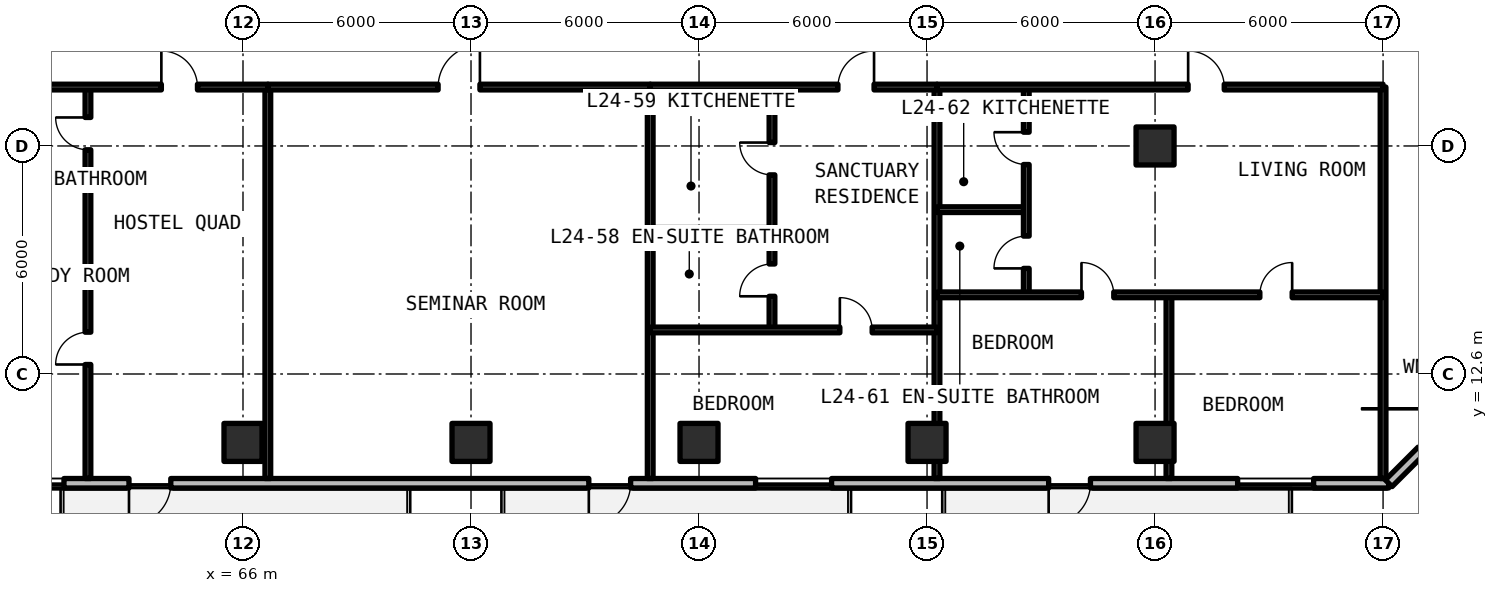
"""IFC4 building model, lengths in metres.
Left out: names, types, materials, properties, quantities, classifications, styles, units other than length and angle.
Written with IfcOpenShell. Run it as: python <this file> out.ifc"""

import sys

from ifc_helpers import new_model, si_unit, direction, frame, frame_2d, origin, origin_2d, place, context, subcontext, project, spatial, rectangle, extrude, element, fill, save


model = new_model("IFC4")
c1 = context("Model", 3, precision=1e-05, world=origin(), true_north=direction((0.0, 1.0)))
c2 = subcontext(c1, "Body", "Model", "MODEL_VIEW")
j1 = project(units=[si_unit("LENGTHUNIT", "METRE"), si_unit("PLANEANGLEUNIT", "RADIAN")], contexts=[c1])
p1 = place(None, origin())
s1 = spatial("IfcSite", under=j1, at=p1, CompositionType="ELEMENT")
p2 = place(p1, origin())
s2 = spatial("IfcBuilding", under=s1, at=p2, CompositionType="ELEMENT")
p3 = place(p2, frame((0.0, 0.0, 88.77)))
s3 = spatial("IfcBuildingStorey", under=s2, at=p3, CompositionType="ELEMENT", Elevation=88.77)
for number, where, z_axis, x_axis in (
    (1, (90.0, 18.6, 0.0), (0.0, 0.0, 1.0), (1.0, 0.0, 0.0)),
    (2, (66.0, 10.8, 0.0), (0.0, 0.0, 1.0), (1.0, 0.0, 0.0)),
    (3, (72.0, 10.8, 0.0), (0.0, 0.0, 1.0), (1.0, 0.0, 0.0)),
    (4, (78.0, 10.8, 0.0), (0.0, 0.0, 1.0), (1.0, 0.0, 0.0)),
    (5, (84.0, 10.8, 0.0), (0.0, 0.0, 1.0), (1.0, 0.0, 0.0)),
    (6, (90.0, 10.8, 0.0), (0.0, 0.0, 1.0), (1.0, 0.0, 0.0)),
):
    element("IfcColumn", number, at=place(p3, frame(where, z_axis=z_axis, x_axis=x_axis)), inside=s3, PredefinedType="COLUMN", context=c2, shape_type="SweptSolid", body=[
        extrude(rectangle(XDim=1.0, YDim=1.0, at=origin_2d()), origin(), (0.0, 0.0, 1.0), 3.3),
    ])
p4 = place(p3, frame((52.125, 9.725, 0.0), z_axis=(0.0, 0.0, 1.0), x_axis=(1.0, 0.0, 0.0)))
e7 = element("IfcWall", 7, at=p4, inside=s3, PredefinedType="SOLIDWALL", context=c2, shape_type="SweptSolid", body=[
    extrude(rectangle(XDim=44.023, YDim=0.25, at=frame_2d((22.012, 0.0))), origin(), (0.0, 0.0, 1.0), 3.08),
])
p5 = place(p4, frame((10.875, 0.0, 0.0)))
e8 = element("IfcOpeningElement", 8, at=p5, cuts=e7, PredefinedType="OPENING", context=c2, shape_type="SweptSolid", body=[
    extrude(rectangle(XDim=1.1, YDim=2.15, at=frame_2d((0.55, 1.075))), frame((0.0, 0.135, 0.0), z_axis=(0.0, -1.0, 0.0), x_axis=(1.0, 0.0, 0.0)), (0.0, 0.0, 1.0), 0.27),
])
p6 = place(p4, frame((22.975, 0.0, 0.0)))
e9 = element("IfcOpeningElement", 9, at=p6, cuts=e7, PredefinedType="OPENING", context=c2, shape_type="SweptSolid", body=[
    extrude(rectangle(XDim=1.1, YDim=2.15, at=frame_2d((0.55, 1.075))), frame((0.0, 0.135, 0.0), z_axis=(0.0, -1.0, 0.0), x_axis=(1.0, 0.0, 0.0)), (0.0, 0.0, 1.0), 0.27),
])
p7 = place(p4, frame((35.075, 0.0, 0.0)))
e10 = element("IfcOpeningElement", 10, at=p7, cuts=e7, PredefinedType="OPENING", context=c2, shape_type="SweptSolid", body=[
    extrude(rectangle(XDim=1.1, YDim=2.15, at=frame_2d((0.55, 1.075))), frame((0.0, 0.135, 0.0), z_axis=(0.0, -1.0, 0.0), x_axis=(1.0, 0.0, 0.0)), (0.0, 0.0, 1.0), 0.27),
])
p8 = place(p4, frame((2.669, 0.0, 0.78)))
e11 = element("IfcOpeningElement", 11, at=p8, cuts=e7, PredefinedType="OPENING", context=c2, shape_type="SweptSolid", body=[
    extrude(rectangle(XDim=2.0, YDim=1.66, at=frame_2d((1.0, 0.83))), frame((0.0, 0.135, 0.0), z_axis=(0.0, -1.0, 0.0), x_axis=(1.0, 0.0, 0.0)), (0.0, 0.0, 1.0), 0.27),
])
p9 = place(p4, frame((8.314, 0.0, 0.78)))
e12 = element("IfcOpeningElement", 12, at=p9, cuts=e7, PredefinedType="OPENING", context=c2, shape_type="SweptSolid", body=[
    extrude(rectangle(XDim=0.85, YDim=1.65, at=frame_2d((0.425, 0.825))), frame((0.0, 0.135, 0.0), z_axis=(0.0, -1.0, 0.0), x_axis=(1.0, 0.0, 0.0)), (0.0, 0.0, 1.0), 0.27),
])
p10 = place(p4, frame((27.363, 0.0, 0.78)))
e13 = element("IfcOpeningElement", 13, at=p10, cuts=e7, PredefinedType="OPENING", context=c2, shape_type="SweptSolid", body=[
    extrude(rectangle(XDim=2.0, YDim=1.66, at=frame_2d((1.0, 0.83))), frame((0.0, 0.135, 0.0), z_axis=(0.0, -1.0, 0.0), x_axis=(1.0, 0.0, 0.0)), (0.0, 0.0, 1.0), 0.27),
])
p11 = place(p4, frame((40.048, 0.0, 0.78)))
e14 = element("IfcOpeningElement", 14, at=p11, cuts=e7, PredefinedType="OPENING", context=c2, shape_type="SweptSolid", body=[
    extrude(rectangle(XDim=2.0, YDim=1.66, at=frame_2d((1.0, 0.83))), frame((0.0, 0.135, 0.0), z_axis=(0.0, -1.0, 0.0), x_axis=(1.0, 0.0, 0.0)), (0.0, 0.0, 1.0), 0.27),
])
p12 = place(p3, frame((96.148, 9.725, 0.0), z_axis=(0.0, 0.0, 1.0), x_axis=(0.707106781187, 0.707106781187, 0.0)))
e15 = element("IfcWall", 15, at=p12, inside=s3, PredefinedType="SOLIDWALL", context=c2, shape_type="SweptSolid", body=[
    extrude(rectangle(XDim=5.836, YDim=0.25, at=frame_2d((2.918, 0.0))), origin(), (0.0, 0.0, 1.0), 3.08),
])
p13 = place(p12, frame((1.218, 0.0, 0.78)))
e16 = element("IfcOpeningElement", 16, at=p13, cuts=e15, PredefinedType="OPENING", context=c2, shape_type="SweptSolid", body=[
    extrude(rectangle(XDim=3.4, YDim=1.66, at=frame_2d((1.7, 0.83))), frame((0.0, 0.135, 0.0), z_axis=(0.0, -1.0, 0.0), x_axis=(1.0, 0.0, 0.0)), (0.0, 0.0, 1.0), 0.27),
])
for number, where, z_axis, x_axis in (
    (17, (96.0, 9.85, 0.0), (0.0, 0.0, 1.0), (0.0, 1.0, 0.0)),
    (18, (66.654, 9.85, 0.0), (0.0, 0.0, 1.0), (0.0, 1.0, 0.0)),
):
    element("IfcWall", number, at=place(p3, frame(where, z_axis=z_axis, x_axis=x_axis)), inside=s3, PredefinedType="SOLIDWALL", context=c2, shape_type="SweptSolid", body=[
        extrude(rectangle(XDim=10.3, YDim=0.15, at=frame_2d((5.15, 0.0))), origin(), (0.0, 0.0, 1.0), 2.35),
    ])
p14 = place(p3, frame((58.828, 17.7, 0.0), z_axis=(0.0, 0.0, 1.0), x_axis=(1.0, 0.0, 0.0)))
e19 = element("IfcWall", 19, at=p14, inside=s3, PredefinedType="PARTITIONING", context=c2, shape_type="SweptSolid", body=[
    extrude(rectangle(XDim=3.092, YDim=0.15, at=frame_2d((1.546, 0.0))), origin(), (0.0, 0.0, 1.0), 2.35),
])
p15 = place(p3, frame((61.92, 9.85, 0.0), z_axis=(0.0, 0.0, 1.0), x_axis=(0.0, 1.0, 0.0)))
e20 = element("IfcWall", 20, at=p15, inside=s3, PredefinedType="PARTITIONING", context=c2, shape_type="SweptSolid", body=[
    extrude(rectangle(XDim=10.3, YDim=0.15, at=frame_2d((5.15, 0.0))), origin(), (0.0, 0.0, 1.0), 2.35),
])
p16 = place(p15, frame((3.0, 0.0, 0.0)))
e21 = element("IfcOpeningElement", 21, at=p16, cuts=e20, PredefinedType="OPENING", context=c2, shape_type="SweptSolid", body=[
    extrude(rectangle(XDim=0.85, YDim=2.1, at=frame_2d((0.425, 1.05))), frame((0.0, 0.085, 0.0), z_axis=(0.0, -1.0, 0.0), x_axis=(1.0, 0.0, 0.0)), (0.0, 0.0, 1.0), 0.17),
])
p17 = place(p15, frame((8.65, 0.0, 0.0)))
e22 = element("IfcOpeningElement", 22, at=p17, cuts=e20, PredefinedType="OPENING", context=c2, shape_type="SweptSolid", body=[
    extrude(rectangle(XDim=0.85, YDim=2.1, at=frame_2d((0.425, 1.05))), frame((0.0, 0.085, 0.0), z_axis=(0.0, -1.0, 0.0), x_axis=(1.0, 0.0, 0.0)), (0.0, 0.0, 1.0), 0.17),
])
p18 = place(p3, frame((58.828, 20.15, 0.0), z_axis=(0.0, 0.0, 1.0), x_axis=(1.0, 0.0, 0.0)))
e23 = element("IfcWall", 23, at=p18, inside=s3, PredefinedType="SOLIDWALL", context=c2, shape_type="SweptSolid", body=[
    extrude(rectangle(XDim=7.826, YDim=0.15, at=frame_2d((3.913, 0.0))), origin(), (0.0, 0.0, 1.0), 2.35),
])
p19 = place(p18, frame((5.024, 0.0, 0.0)))
e24 = element("IfcOpeningElement", 24, at=p19, cuts=e23, PredefinedType="OPENING", context=c2, shape_type="SweptSolid", body=[
    extrude(rectangle(XDim=0.95, YDim=2.15, at=frame_2d((0.475, 1.075))), frame((0.0, 0.085, 0.0), z_axis=(0.0, -1.0, 0.0), x_axis=(1.0, 0.0, 0.0)), (0.0, 0.0, 1.0), 0.17),
])
p20 = place(p3, frame((76.715, 9.85, 0.0), z_axis=(0.0, 0.0, 1.0), x_axis=(0.0, 1.0, 0.0)))
e25 = element("IfcWall", 25, at=p20, inside=s3, PredefinedType="SOLIDWALL", context=c2, shape_type="SweptSolid", body=[
    extrude(rectangle(XDim=10.3, YDim=0.15, at=frame_2d((5.15, 0.0))), origin(), (0.0, 0.0, 1.0), 2.35),
])
p21 = place(p3, frame((66.654, 20.15, 0.0), z_axis=(0.0, 0.0, 1.0), x_axis=(1.0, 0.0, 0.0)))
e26 = element("IfcWall", 26, at=p21, inside=s3, PredefinedType="SOLIDWALL", context=c2, shape_type="SweptSolid", body=[
    extrude(rectangle(XDim=10.062, YDim=0.15, at=frame_2d((5.031, 0.0))), origin(), (0.0, 0.0, 1.0), 2.35),
])
p22 = place(p21, frame((4.481, 0.0, 0.0)))
e27 = element("IfcOpeningElement", 27, at=p22, cuts=e26, PredefinedType="OPENING", context=c2, shape_type="SweptSolid", body=[
    extrude(rectangle(XDim=1.1, YDim=2.15, at=frame_2d((0.55, 1.075))), frame((0.0, 0.085, 0.0), z_axis=(0.0, -1.0, 0.0), x_axis=(1.0, 0.0, 0.0)), (0.0, 0.0, 1.0), 0.17),
])
p23 = place(p3, frame((84.261, 9.85, 0.0), z_axis=(0.0, 0.0, 1.0), x_axis=(0.0, 1.0, 0.0)))
e28 = element("IfcWall", 28, at=p23, inside=s3, PredefinedType="SOLIDWALL", context=c2, shape_type="SweptSolid", body=[
    extrude(rectangle(XDim=10.3, YDim=0.15, at=frame_2d((5.15, 0.0))), origin(), (0.0, 0.0, 1.0), 2.35),
])
p24 = place(p3, frame((76.715, 16.379, 0.0), z_axis=(0.0, 0.0, 1.0), x_axis=(1.0, 0.0, 0.0)))
e29 = element("IfcWall", 29, at=p24, inside=s3, PredefinedType="PARTITIONING", context=c2, shape_type="SweptSolid", body=[
    extrude(rectangle(XDim=3.205, YDim=0.15, at=frame_2d((1.603, 0.0))), origin(), (0.0, 0.0, 1.0), 2.35),
])
p25 = place(p3, frame((79.92, 13.759, 0.0), z_axis=(0.0, 0.0, 1.0), x_axis=(0.0, 1.0, 0.0)))
e30 = element("IfcWall", 30, at=p25, inside=s3, PredefinedType="PARTITIONING", context=c2, shape_type="SweptSolid", body=[
    extrude(rectangle(XDim=6.391, YDim=0.15, at=frame_2d((3.195, 0.0))), origin(), (0.0, 0.0, 1.0), 2.35),
])
p26 = place(p25, frame((0.885, 0.0, 0.0)))
e31 = element("IfcOpeningElement", 31, at=p26, cuts=e30, PredefinedType="OPENING", context=c2, shape_type="SweptSolid", body=[
    extrude(rectangle(XDim=0.85, YDim=2.1, at=frame_2d((0.425, 1.05))), frame((0.0, 0.085, 0.0), z_axis=(0.0, -1.0, 0.0), x_axis=(1.0, 0.0, 0.0)), (0.0, 0.0, 1.0), 0.17),
])
p27 = place(p25, frame((4.08, 0.0, 0.0)))
e32 = element("IfcOpeningElement", 32, at=p27, cuts=e30, PredefinedType="OPENING", context=c2, shape_type="SweptSolid", body=[
    extrude(rectangle(XDim=0.85, YDim=2.1, at=frame_2d((0.425, 1.05))), frame((0.0, 0.085, 0.0), z_axis=(0.0, -1.0, 0.0), x_axis=(1.0, 0.0, 0.0)), (0.0, 0.0, 1.0), 0.17),
])
p28 = place(p3, frame((76.715, 13.759, 0.0), z_axis=(0.0, 0.0, 1.0), x_axis=(1.0, 0.0, 0.0)))
e33 = element("IfcWall", 33, at=p28, inside=s3, PredefinedType="PARTITIONING", context=c2, shape_type="SweptSolid", body=[
    extrude(rectangle(XDim=7.546, YDim=0.15, at=frame_2d((3.773, 0.0))), origin(), (0.0, 0.0, 1.0), 2.35),
])
p29 = place(p28, frame((4.99, 0.0, 0.0)))
e34 = element("IfcOpeningElement", 34, at=p29, cuts=e33, PredefinedType="OPENING", context=c2, shape_type="SweptSolid", body=[
    extrude(rectangle(XDim=0.85, YDim=2.1, at=frame_2d((0.425, 1.05))), frame((0.0, 0.085, 0.0), z_axis=(0.0, -1.0, 0.0), x_axis=(1.0, 0.0, 0.0)), (0.0, 0.0, 1.0), 0.17),
])
p30 = place(p3, frame((76.715, 20.15, 0.0), z_axis=(0.0, 0.0, 1.0), x_axis=(1.0, 0.0, 0.0)))
e35 = element("IfcWall", 35, at=p30, inside=s3, PredefinedType="SOLIDWALL", context=c2, shape_type="SweptSolid", body=[
    extrude(rectangle(XDim=7.546, YDim=0.15, at=frame_2d((3.773, 0.0))), origin(), (0.0, 0.0, 1.0), 2.35),
])
p31 = place(p30, frame((4.94, 0.0, 0.0)))
e36 = element("IfcOpeningElement", 36, at=p31, cuts=e35, PredefinedType="OPENING", context=c2, shape_type="SweptSolid", body=[
    extrude(rectangle(XDim=0.95, YDim=2.15, at=frame_2d((0.475, 1.075))), frame((0.0, 0.085, 0.0), z_axis=(0.0, -1.0, 0.0), x_axis=(1.0, 0.0, 0.0)), (0.0, 0.0, 1.0), 0.17),
])
p32 = place(p3, frame((84.261, 16.924, 0.0), z_axis=(0.0, 0.0, 1.0), x_axis=(1.0, 0.0, 0.0)))
e37 = element("IfcWall", 37, at=p32, inside=s3, PredefinedType="PARTITIONING", context=c2, shape_type="SweptSolid", body=[
    extrude(rectangle(XDim=2.35, YDim=0.15, at=frame_2d((1.175, 0.0))), origin(), (0.0, 0.0, 1.0), 2.35),
])
p33 = place(p3, frame((86.611, 14.683, 0.0), z_axis=(0.0, 0.0, 1.0), x_axis=(0.0, 1.0, 0.0)))
e38 = element("IfcWall", 38, at=p33, inside=s3, PredefinedType="PARTITIONING", context=c2, shape_type="SweptSolid", body=[
    extrude(rectangle(XDim=5.467, YDim=0.15, at=frame_2d((2.733, 0.0))), origin(), (0.0, 0.0, 1.0), 2.35),
])
p34 = place(p33, frame((0.696, 0.0, 0.0)))
e39 = element("IfcOpeningElement", 39, at=p34, cuts=e38, PredefinedType="OPENING", context=c2, shape_type="SweptSolid", body=[
    extrude(rectangle(XDim=0.85, YDim=2.1, at=frame_2d((0.425, 1.05))), frame((0.0, 0.085, 0.0), z_axis=(0.0, -1.0, 0.0), x_axis=(1.0, 0.0, 0.0)), (0.0, 0.0, 1.0), 0.17),
])
p35 = place(p33, frame((3.429, 0.0, 0.0)))
e40 = element("IfcOpeningElement", 40, at=p35, cuts=e38, PredefinedType="OPENING", context=c2, shape_type="SweptSolid", body=[
    extrude(rectangle(XDim=0.85, YDim=2.1, at=frame_2d((0.425, 1.05))), frame((0.0, 0.085, 0.0), z_axis=(0.0, -1.0, 0.0), x_axis=(1.0, 0.0, 0.0)), (0.0, 0.0, 1.0), 0.17),
])
p36 = place(p3, frame((90.365, 9.85, 0.0), z_axis=(0.0, 0.0, 1.0), x_axis=(0.0, 1.0, 0.0)))
e41 = element("IfcWall", 41, at=p36, inside=s3, PredefinedType="PARTITIONING", context=c2, shape_type="SweptSolid", body=[
    extrude(rectangle(XDim=4.833, YDim=0.15, at=frame_2d((2.417, 0.0))), origin(), (0.0, 0.0, 1.0), 2.35),
])
p37 = place(p3, frame((84.261, 14.683, 0.0), z_axis=(0.0, 0.0, 1.0), x_axis=(1.0, 0.0, 0.0)))
e42 = element("IfcWall", 42, at=p37, inside=s3, PredefinedType="PARTITIONING", context=c2, shape_type="SweptSolid", body=[
    extrude(rectangle(XDim=11.739, YDim=0.15, at=frame_2d((5.869, 0.0))), origin(), (0.0, 0.0, 1.0), 2.35),
])
p38 = place(p37, frame((3.802, 0.0, 0.0)))
e43 = element("IfcOpeningElement", 43, at=p38, cuts=e42, PredefinedType="OPENING", context=c2, shape_type="SweptSolid", body=[
    extrude(rectangle(XDim=0.85, YDim=2.1, at=frame_2d((0.425, 1.05))), frame((0.0, 0.085, 0.0), z_axis=(0.0, -1.0, 0.0), x_axis=(1.0, 0.0, 0.0)), (0.0, 0.0, 1.0), 0.17),
])
p39 = place(p37, frame((8.496, 0.0, 0.0)))
e44 = element("IfcOpeningElement", 44, at=p39, cuts=e42, PredefinedType="OPENING", context=c2, shape_type="SweptSolid", body=[
    extrude(rectangle(XDim=0.85, YDim=2.1, at=frame_2d((0.425, 1.05))), frame((0.0, 0.085, 0.0), z_axis=(0.0, -1.0, 0.0), x_axis=(1.0, 0.0, 0.0)), (0.0, 0.0, 1.0), 0.17),
])
p40 = place(p3, frame((84.261, 20.15, 0.0), z_axis=(0.0, 0.0, 1.0), x_axis=(1.0, 0.0, 0.0)))
e45 = element("IfcWall", 45, at=p40, inside=s3, PredefinedType="SOLIDWALL", context=c2, shape_type="SweptSolid", body=[
    extrude(rectangle(XDim=11.739, YDim=0.15, at=frame_2d((5.869, 0.0))), origin(), (0.0, 0.0, 1.0), 2.35),
])
p41 = place(p40, frame((6.609, 0.0, 0.0)))
e46 = element("IfcOpeningElement", 46, at=p41, cuts=e45, PredefinedType="OPENING", context=c2, shape_type="SweptSolid", body=[
    extrude(rectangle(XDim=0.95, YDim=2.15, at=frame_2d((0.475, 1.075))), frame((0.0, 0.085, 0.0), z_axis=(0.0, -1.0, 0.0), x_axis=(1.0, 0.0, 0.0)), (0.0, 0.0, 1.0), 0.17),
])
p42 = place(p5, frame((1.1, 0.0, 0.0), z_axis=(0.0, 0.0, 1.0), x_axis=(-1.0, 0.0, 0.0)))
e47 = element("IfcDoor", 47, at=p42, inside=s3, OperationType="SINGLE_SWING_LEFT", PredefinedType="DOOR", context=c2, shape_type="SweptSolid", body=[
    extrude(rectangle(XDim=1.1, YDim=2.15, at=frame_2d((0.55, 1.075))), frame((0.0, 0.025, 0.0), z_axis=(0.0, -1.0, 0.0), x_axis=(1.0, 0.0, 0.0)), (0.0, 0.0, 1.0), 0.05),
])
fill(e8, e47)
p43 = place(p6, frame((1.1, 0.0, 0.0), z_axis=(0.0, 0.0, 1.0), x_axis=(-1.0, 0.0, 0.0)))
e48 = element("IfcDoor", 48, at=p43, inside=s3, OperationType="SINGLE_SWING_RIGHT", PredefinedType="DOOR", context=c2, shape_type="SweptSolid", body=[
    extrude(rectangle(XDim=1.1, YDim=2.15, at=frame_2d((0.55, 1.075))), frame((0.0, 0.025, 0.0), z_axis=(0.0, -1.0, 0.0), x_axis=(1.0, 0.0, 0.0)), (0.0, 0.0, 1.0), 0.05),
])
fill(e9, e48)
p44 = place(p7, frame((1.1, 0.0, 0.0), z_axis=(0.0, 0.0, 1.0), x_axis=(-1.0, 0.0, 0.0)))
e49 = element("IfcDoor", 49, at=p44, inside=s3, OperationType="SINGLE_SWING_LEFT", PredefinedType="DOOR", context=c2, shape_type="SweptSolid", body=[
    extrude(rectangle(XDim=1.1, YDim=2.15, at=frame_2d((0.55, 1.075))), frame((0.0, 0.025, 0.0), z_axis=(0.0, -1.0, 0.0), x_axis=(1.0, 0.0, 0.0)), (0.0, 0.0, 1.0), 0.05),
])
fill(e10, e49)
p45 = place(p9, origin())
e50 = element("IfcWindow", 50, at=p45, inside=s3, PartitioningType="SINGLE_PANEL", PredefinedType="WINDOW", context=c2, shape_type="SweptSolid", body=[
    extrude(rectangle(XDim=0.85, YDim=1.65, at=frame_2d((0.425, 0.825))), frame((0.0, 0.03, 0.0), z_axis=(0.0, -1.0, 0.0), x_axis=(1.0, 0.0, 0.0)), (0.0, 0.0, 1.0), 0.06),
])
fill(e12, e50)
p46 = place(p10, origin())
e51 = element("IfcWindow", 51, at=p46, inside=s3, PartitioningType="SINGLE_PANEL", PredefinedType="WINDOW", context=c2, shape_type="SweptSolid", body=[
    extrude(rectangle(XDim=2.0, YDim=1.66, at=frame_2d((1.0, 0.83))), frame((0.0, 0.03, 0.0), z_axis=(0.0, -1.0, 0.0), x_axis=(1.0, 0.0, 0.0)), (0.0, 0.0, 1.0), 0.06),
])
fill(e13, e51)
p47 = place(p11, origin())
e52 = element("IfcWindow", 52, at=p47, inside=s3, PartitioningType="SINGLE_PANEL", PredefinedType="WINDOW", context=c2, shape_type="SweptSolid", body=[
    extrude(rectangle(XDim=2.0, YDim=1.66, at=frame_2d((1.0, 0.83))), frame((0.0, 0.03, 0.0), z_axis=(0.0, -1.0, 0.0), x_axis=(1.0, 0.0, 0.0)), (0.0, 0.0, 1.0), 0.06),
])
fill(e14, e52)
p48 = place(p16, origin())
e53 = element("IfcDoor", 53, at=p48, inside=s3, OperationType="SINGLE_SWING_LEFT", PredefinedType="DOOR", context=c2, shape_type="SweptSolid", body=[
    extrude(rectangle(XDim=0.85, YDim=2.1, at=frame_2d((0.425, 1.05))), frame((0.0, 0.025, 0.0), z_axis=(0.0, -1.0, 0.0), x_axis=(1.0, 0.0, 0.0)), (0.0, 0.0, 1.0), 0.05),
])
fill(e21, e53)
p49 = place(p17, origin())
e54 = element("IfcDoor", 54, at=p49, inside=s3, OperationType="SINGLE_SWING_RIGHT", PredefinedType="DOOR", context=c2, shape_type="SweptSolid", body=[
    extrude(rectangle(XDim=0.85, YDim=2.1, at=frame_2d((0.425, 1.05))), frame((0.0, 0.025, 0.0), z_axis=(0.0, -1.0, 0.0), x_axis=(1.0, 0.0, 0.0)), (0.0, 0.0, 1.0), 0.05),
])
fill(e22, e54)
p50 = place(p19, origin())
e55 = element("IfcDoor", 55, at=p50, inside=s3, OperationType="SINGLE_SWING_LEFT", PredefinedType="DOOR", context=c2, shape_type="SweptSolid", body=[
    extrude(rectangle(XDim=0.95, YDim=2.15, at=frame_2d((0.475, 1.075))), frame((0.0, 0.025, 0.0), z_axis=(0.0, -1.0, 0.0), x_axis=(1.0, 0.0, 0.0)), (0.0, 0.0, 1.0), 0.05),
])
fill(e24, e55)
p51 = place(p22, origin())
e56 = element("IfcDoor", 56, at=p51, inside=s3, OperationType="SINGLE_SWING_RIGHT", PredefinedType="DOOR", context=c2, shape_type="SweptSolid", body=[
    extrude(rectangle(XDim=1.1, YDim=2.15, at=frame_2d((0.55, 1.075))), frame((0.0, 0.025, 0.0), z_axis=(0.0, -1.0, 0.0), x_axis=(1.0, 0.0, 0.0)), (0.0, 0.0, 1.0), 0.05),
])
fill(e27, e56)
p52 = place(p26, origin())
e57 = element("IfcDoor", 57, at=p52, inside=s3, OperationType="SINGLE_SWING_LEFT", PredefinedType="DOOR", context=c2, shape_type="SweptSolid", body=[
    extrude(rectangle(XDim=0.85, YDim=2.1, at=frame_2d((0.425, 1.05))), frame((0.0, 0.025, 0.0), z_axis=(0.0, -1.0, 0.0), x_axis=(1.0, 0.0, 0.0)), (0.0, 0.0, 1.0), 0.05),
])
fill(e31, e57)
p53 = place(p27, origin())
e58 = element("IfcDoor", 58, at=p53, inside=s3, OperationType="SINGLE_SWING_RIGHT", PredefinedType="DOOR", context=c2, shape_type="SweptSolid", body=[
    extrude(rectangle(XDim=0.85, YDim=2.1, at=frame_2d((0.425, 1.05))), frame((0.0, 0.025, 0.0), z_axis=(0.0, -1.0, 0.0), x_axis=(1.0, 0.0, 0.0)), (0.0, 0.0, 1.0), 0.05),
])
fill(e32, e58)
p54 = place(p29, origin())
e59 = element("IfcDoor", 59, at=p54, inside=s3, OperationType="SINGLE_SWING_LEFT", PredefinedType="DOOR", context=c2, shape_type="SweptSolid", body=[
    extrude(rectangle(XDim=0.85, YDim=2.1, at=frame_2d((0.425, 1.05))), frame((0.0, 0.025, 0.0), z_axis=(0.0, -1.0, 0.0), x_axis=(1.0, 0.0, 0.0)), (0.0, 0.0, 1.0), 0.05),
])
fill(e34, e59)
p55 = place(p31, origin())
e60 = element("IfcDoor", 60, at=p55, inside=s3, OperationType="SINGLE_SWING_RIGHT", PredefinedType="DOOR", context=c2, shape_type="SweptSolid", body=[
    extrude(rectangle(XDim=0.95, YDim=2.15, at=frame_2d((0.475, 1.075))), frame((0.0, 0.025, 0.0), z_axis=(0.0, -1.0, 0.0), x_axis=(1.0, 0.0, 0.0)), (0.0, 0.0, 1.0), 0.05),
])
fill(e36, e60)
p56 = place(p34, origin())
e61 = element("IfcDoor", 61, at=p56, inside=s3, OperationType="SINGLE_SWING_LEFT", PredefinedType="DOOR", context=c2, shape_type="SweptSolid", body=[
    extrude(rectangle(XDim=0.85, YDim=2.1, at=frame_2d((0.425, 1.05))), frame((0.0, 0.025, 0.0), z_axis=(0.0, -1.0, 0.0), x_axis=(1.0, 0.0, 0.0)), (0.0, 0.0, 1.0), 0.05),
])
fill(e39, e61)
p57 = place(p35, origin())
e62 = element("IfcDoor", 62, at=p57, inside=s3, OperationType="SINGLE_SWING_RIGHT", PredefinedType="DOOR", context=c2, shape_type="SweptSolid", body=[
    extrude(rectangle(XDim=0.85, YDim=2.1, at=frame_2d((0.425, 1.05))), frame((0.0, 0.025, 0.0), z_axis=(0.0, -1.0, 0.0), x_axis=(1.0, 0.0, 0.0)), (0.0, 0.0, 1.0), 0.05),
])
fill(e40, e62)
p58 = place(p38, origin())
e63 = element("IfcDoor", 63, at=p58, inside=s3, OperationType="SINGLE_SWING_LEFT", PredefinedType="DOOR", context=c2, shape_type="SweptSolid", body=[
    extrude(rectangle(XDim=0.85, YDim=2.1, at=frame_2d((0.425, 1.05))), frame((0.0, 0.025, 0.0), z_axis=(0.0, -1.0, 0.0), x_axis=(1.0, 0.0, 0.0)), (0.0, 0.0, 1.0), 0.05),
])
fill(e43, e63)
p59 = place(p39, origin())
e64 = element("IfcDoor", 64, at=p59, inside=s3, OperationType="SINGLE_SWING_RIGHT", PredefinedType="DOOR", context=c2, shape_type="SweptSolid", body=[
    extrude(rectangle(XDim=0.85, YDim=2.1, at=frame_2d((0.425, 1.05))), frame((0.0, 0.025, 0.0), z_axis=(0.0, -1.0, 0.0), x_axis=(1.0, 0.0, 0.0)), (0.0, 0.0, 1.0), 0.05),
])
fill(e44, e64)
p60 = place(p41, origin())
e65 = element("IfcDoor", 65, at=p60, inside=s3, OperationType="SINGLE_SWING_LEFT", PredefinedType="DOOR", context=c2, shape_type="SweptSolid", body=[
    extrude(rectangle(XDim=0.95, YDim=2.15, at=frame_2d((0.475, 1.075))), frame((0.0, 0.025, 0.0), z_axis=(0.0, -1.0, 0.0), x_axis=(1.0, 0.0, 0.0)), (0.0, 0.0, 1.0), 0.05),
])
fill(e46, e65)
save(model, sys.argv[1])
